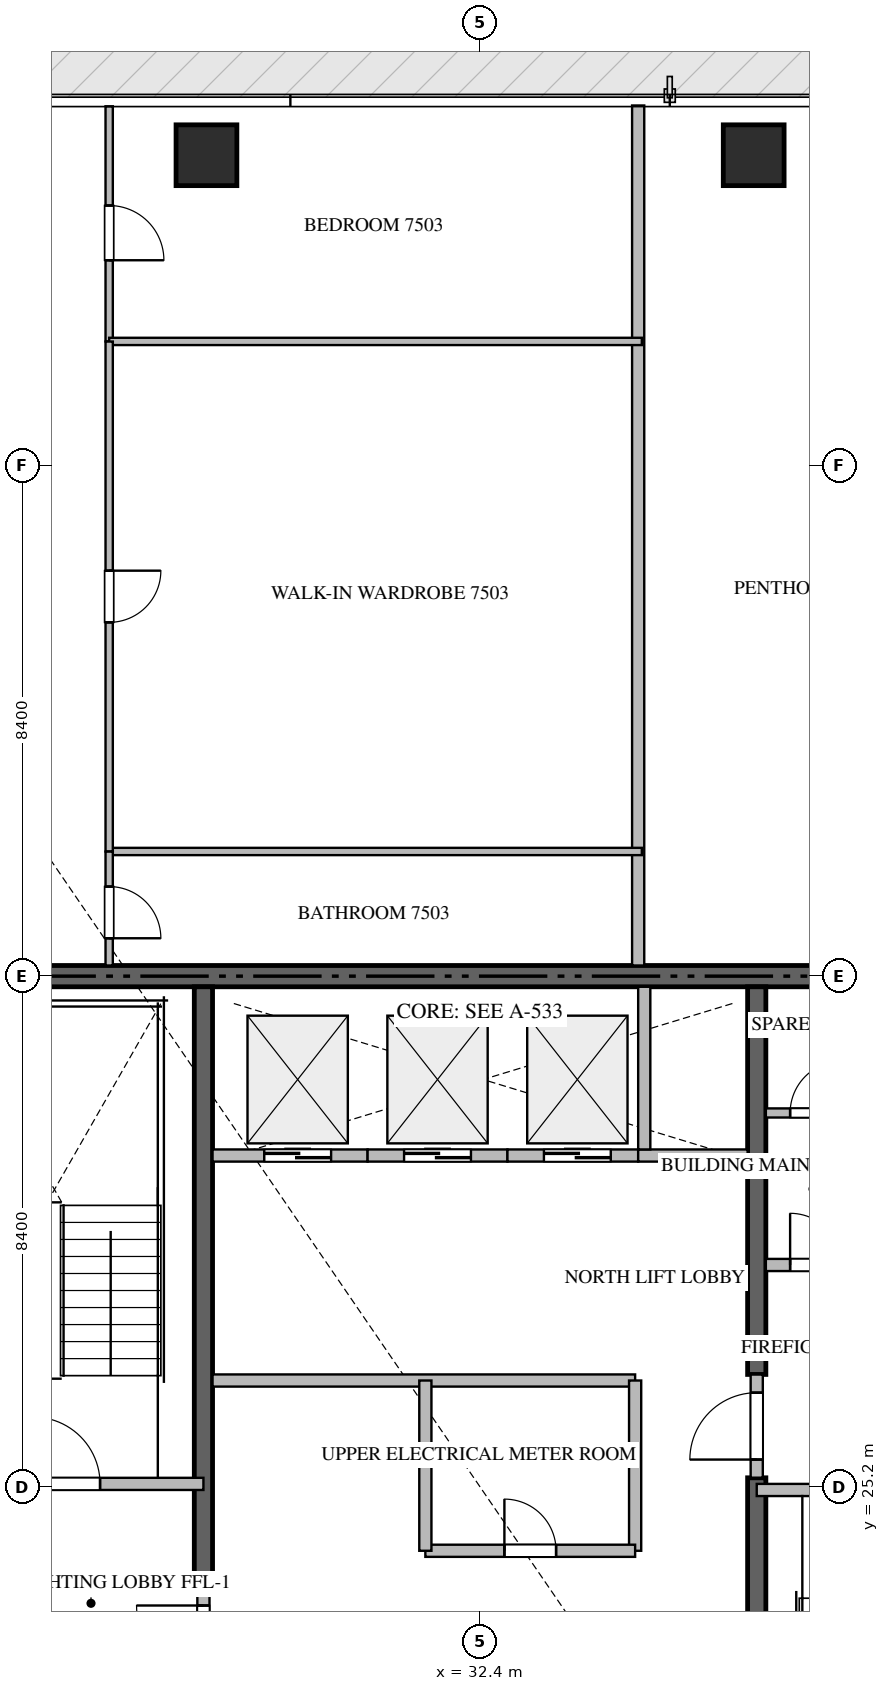
"""IFC4 building model, lengths in metres.
Left out: names, types, materials, properties, quantities, classifications, styles, units other than length and angle.
Written with IfcOpenShell. Run it as: python <this file> out.ifc"""

import sys

from ifc_helpers import new_model, si_unit, direction, frame, frame_2d, origin, origin_2d, place, context, subcontext, project, spatial, rectangle, extrude, source, transform, mapped, element, fill, save


model = new_model("IFC4")
c1 = context("Model", 3, precision=1e-05, world=origin(), true_north=direction((0.0, 1.0)))
c2 = subcontext(c1, "Body", "Model", "MODEL_VIEW")
j1 = project(units=[si_unit("LENGTHUNIT", "METRE"), si_unit("PLANEANGLEUNIT", "RADIAN")], contexts=[c1])
p1 = place(None, origin())
s1 = spatial("IfcSite", under=j1, at=p1, CompositionType="ELEMENT")
p2 = place(p1, origin())
s2 = spatial("IfcBuilding", under=s1, at=p2, CompositionType="ELEMENT")
p3 = place(p2, frame((0.0, 0.0, 301.55)))
s3 = spatial("IfcBuildingStorey", under=s2, at=p3, CompositionType="ELEMENT", Elevation=301.55)
p4 = place(p3, frame((41.4, 33.6, -0.26), z_axis=(0.0, 0.0, 1.0), x_axis=(-1.0, 0.0, 0.0)))
e1 = element("IfcWall", 1, at=p4, inside=s3, PredefinedType="SHEAR", context=c2, shape_type="SweptSolid", body=[
    extrude(rectangle(XDim=18.0, YDim=0.35, at=frame_2d((9.0, 0.0))), origin(), (0.0, 0.0, 1.0), 4.048),
])
p5 = place(p3, frame((27.85, 23.55, -0.26), z_axis=(0.0, 0.0, 1.0), x_axis=(0.0, 1.0, 0.0)))
e2 = element("IfcWall", 2, at=p5, inside=s3, PredefinedType="SHEAR", context=c2, shape_type="SweptSolid", body=[
    extrude(rectangle(XDim=9.875, YDim=0.3, at=frame_2d((4.938, 0.0))), origin(), (0.0, 0.0, 1.0), 4.048),
])
p6 = place(p3, frame((36.95, 16.975, -0.26), z_axis=(0.0, 0.0, 1.0), x_axis=(0.0, 1.0, 0.0)))
e3 = element("IfcWall", 3, at=p6, inside=s3, PredefinedType="SHEAR", context=c2, shape_type="SweptSolid", body=[
    extrude(rectangle(XDim=8.375, YDim=0.3, at=frame_2d((4.188, 0.0))), origin(), (0.0, 0.0, 1.0), 4.048),
])
p7 = place(p3, frame((36.95, 27.05, -0.26), z_axis=(0.0, 0.0, 1.0), x_axis=(0.0, 1.0, 0.0)))
e4 = element("IfcWall", 4, at=p7, inside=s3, PredefinedType="SHEAR", context=c2, shape_type="SweptSolid", body=[
    extrude(rectangle(XDim=6.375, YDim=0.3, at=frame_2d((3.188, 0.0))), origin(), (0.0, 0.0, 1.0), 4.048),
])
m1 = source(origin(), c2, "Body", "SweptSolid", [
    extrude(rectangle(XDim=1.0, YDim=1.0, at=origin_2d()), origin(), (0.0, 0.0, 1.0), 4.05),
])
for number, where, z_axis, x_axis in (
    (5, (27.9, 47.1, -0.26), (0.0, 0.0, 1.0), (1.0, 0.0, 0.0)),
    (6, (36.9, 47.1, -0.26), (0.0, 0.0, 1.0), (1.0, 0.0, 0.0)),
):
    element("IfcColumn", number, at=place(p3, frame(where, z_axis=z_axis, x_axis=x_axis)), inside=s3, PredefinedType="COLUMN", context=c2, shape_type="MappedRepresentation", body=[
        mapped(m1, transform((0.0, 0.0, 0.0), scale=1.0)),
    ])
p8 = place(p3, frame((23.4, 25.25, 0.0), z_axis=(0.0, 0.0, 1.0), x_axis=(1.0, 0.0, 0.0)))
e7 = element("IfcWall", 7, at=p8, inside=s3, PredefinedType="STANDARD", context=c2, shape_type="SweptSolid", body=[
    extrude(rectangle(XDim=4.45, YDim=0.2, at=frame_2d((2.225, 0.0))), origin(), (0.0, 0.0, 1.0), 3.79),
])
p9 = place(p8, frame((1.65, 0.0, 0.0)))
e8 = element("IfcOpeningElement", 8, at=p9, cuts=e7, PredefinedType="OPENING", context=c2, shape_type="SweptSolid", body=[
    extrude(rectangle(XDim=1.1, YDim=2.15, at=frame_2d((0.55, 1.075))), frame((0.0, 0.11, 0.0), z_axis=(0.0, -1.0, 0.0), x_axis=(1.0, 0.0, 0.0)), (0.0, 0.0, 1.0), 0.22),
])
p10 = place(p3, frame((36.95, 25.15, 0.0), z_axis=(0.0, 0.0, 1.0), x_axis=(1.0, 0.0, 0.0)))
e9 = element("IfcWall", 9, at=p10, inside=s3, PredefinedType="STANDARD", context=c2, shape_type="SweptSolid", body=[
    extrude(rectangle(XDim=4.45, YDim=0.2, at=frame_2d((2.225, 0.0))), origin(), (0.0, 0.0, 1.0), 3.79),
])
p11 = place(p10, frame((1.65, 0.0, 0.0)))
e10 = element("IfcOpeningElement", 10, at=p11, cuts=e9, PredefinedType="OPENING", context=c2, shape_type="SweptSolid", body=[
    extrude(rectangle(XDim=1.1, YDim=2.15, at=frame_2d((0.55, 1.075))), frame((0.0, 0.11, 0.0), z_axis=(0.0, -1.0, 0.0), x_axis=(1.0, 0.0, 0.0)), (0.0, 0.0, 1.0), 0.22),
])
p12 = place(p3, frame((28.0, 30.65, 0.0), z_axis=(0.0, 0.0, 1.0), x_axis=(1.0, 0.0, 0.0)))
e11 = element("IfcWall", 11, at=p12, inside=s3, PredefinedType="STANDARD", context=c2, shape_type="SweptSolid", body=[
    extrude(rectangle(XDim=2.55, YDim=0.2, at=frame_2d((1.275, 0.0))), origin(), (0.0, 0.0, 1.0), 3.79),
])
p13 = place(p12, frame((0.85, 0.0, 0.0)))
e12 = element("IfcOpeningElement", 12, at=p13, cuts=e11, PredefinedType="OPENING", context=c2, shape_type="SweptSolid", body=[
    extrude(rectangle(XDim=1.1, YDim=2.2, at=frame_2d((0.55, 1.1))), frame((0.0, 0.11, 0.0), z_axis=(0.0, -1.0, 0.0), x_axis=(1.0, 0.0, 0.0)), (0.0, 0.0, 1.0), 0.22),
])
p14 = place(p3, frame((30.55, 30.65, 0.0), z_axis=(0.0, 0.0, 1.0), x_axis=(1.0, 0.0, 0.0)))
e13 = element("IfcWall", 13, at=p14, inside=s3, PredefinedType="STANDARD", context=c2, shape_type="SweptSolid", body=[
    extrude(rectangle(XDim=2.3, YDim=0.2, at=frame_2d((1.15, 0.0))), origin(), (0.0, 0.0, 1.0), 3.79),
])
p15 = place(p14, frame((0.6, 0.0, 0.0)))
e14 = element("IfcOpeningElement", 14, at=p15, cuts=e13, PredefinedType="OPENING", context=c2, shape_type="SweptSolid", body=[
    extrude(rectangle(XDim=1.1, YDim=2.2, at=frame_2d((0.55, 1.1))), frame((0.0, 0.11, 0.0), z_axis=(0.0, -1.0, 0.0), x_axis=(1.0, 0.0, 0.0)), (0.0, 0.0, 1.0), 0.22),
])
p16 = place(p3, frame((32.85, 30.65, 0.0), z_axis=(0.0, 0.0, 1.0), x_axis=(1.0, 0.0, 0.0)))
e15 = element("IfcWall", 15, at=p16, inside=s3, PredefinedType="STANDARD", context=c2, shape_type="SweptSolid", body=[
    extrude(rectangle(XDim=2.15, YDim=0.2, at=frame_2d((1.075, 0.0))), origin(), (0.0, 0.0, 1.0), 3.79),
])
p17 = place(p16, frame((0.6, 0.0, 0.0)))
e16 = element("IfcOpeningElement", 16, at=p17, cuts=e15, PredefinedType="OPENING", context=c2, shape_type="SweptSolid", body=[
    extrude(rectangle(XDim=1.1, YDim=2.2, at=frame_2d((0.55, 1.1))), frame((0.0, 0.11, 0.0), z_axis=(0.0, -1.0, 0.0), x_axis=(1.0, 0.0, 0.0)), (0.0, 0.0, 1.0), 0.22),
])
p18 = place(p3, frame((35.0, 30.65, 0.0), z_axis=(0.0, 0.0, 1.0), x_axis=(1.0, 0.0, 0.0)))
e17 = element("IfcWall", 17, at=p18, inside=s3, PredefinedType="STANDARD", context=c2, shape_type="SweptSolid", body=[
    extrude(rectangle(XDim=1.8, YDim=0.2, at=frame_2d((0.9, 0.0))), origin(), (0.0, 0.0, 1.0), 3.79),
])
p19 = place(p3, frame((35.1, 30.75, 0.0), z_axis=(0.0, 0.0, 1.0), x_axis=(0.0, 1.0, 0.0)))
e18 = element("IfcWall", 18, at=p19, inside=s3, PredefinedType="STANDARD", context=c2, shape_type="SweptSolid", body=[
    extrude(rectangle(XDim=2.675, YDim=0.2, at=frame_2d((1.337, 0.0))), origin(), (0.0, 0.0, 1.0), 3.79),
])
p20 = place(p3, frame((37.1, 28.85, 0.0), z_axis=(0.0, 0.0, 1.0), x_axis=(1.0, 0.0, 0.0)))
e19 = element("IfcWall", 19, at=p20, inside=s3, PredefinedType="STANDARD", context=c2, shape_type="SweptSolid", body=[
    extrude(rectangle(XDim=1.648, YDim=0.2, at=frame_2d((0.824, 0.0))), origin(), (0.0, 0.0, 1.0), 3.79),
])
p21 = place(p20, frame((0.399, 0.0, 0.0)))
e20 = element("IfcOpeningElement", 20, at=p21, cuts=e19, PredefinedType="OPENING", context=c2, shape_type="SweptSolid", body=[
    extrude(rectangle(XDim=0.85, YDim=2.1, at=frame_2d((0.425, 1.05))), frame((0.0, 0.11, 0.0), z_axis=(0.0, -1.0, 0.0), x_axis=(1.0, 0.0, 0.0)), (0.0, 0.0, 1.0), 0.22),
])
p22 = place(p3, frame((27.85, 21.852, 0.0), z_axis=(0.0, 0.0, 1.0), x_axis=(0.0, 1.0, 0.0)))
e21 = element("IfcWall", 21, at=p22, inside=s3, PredefinedType="STANDARD", context=c2, shape_type="SweptSolid", body=[
    extrude(rectangle(XDim=1.696, YDim=0.2, at=frame_2d((0.848, 0.0))), origin(), (0.0, 0.0, 1.0), 3.79),
])
p23 = place(p22, frame((0.298, 0.0, 0.0)))
e22 = element("IfcOpeningElement", 22, at=p23, cuts=e21, PredefinedType="OPENING", context=c2, shape_type="SweptSolid", body=[
    extrude(rectangle(XDim=1.1, YDim=2.15, at=frame_2d((0.55, 1.075))), frame((0.0, 0.11, 0.0), z_axis=(0.0, -1.0, 0.0), x_axis=(1.0, 0.0, 0.0)), (0.0, 0.0, 1.0), 0.22),
])
p24 = place(p3, frame((36.95, 25.352, 0.0), z_axis=(0.0, 0.0, 1.0), x_axis=(0.0, 1.0, 0.0)))
e23 = element("IfcWall", 23, at=p24, inside=s3, PredefinedType="STANDARD", context=c2, shape_type="SweptSolid", body=[
    extrude(rectangle(XDim=1.696, YDim=0.2, at=frame_2d((0.848, 0.0))), origin(), (0.0, 0.0, 1.0), 3.79),
])
p25 = place(p24, frame((0.298, 0.0, 0.0)))
e24 = element("IfcOpeningElement", 24, at=p25, cuts=e23, PredefinedType="OPENING", context=c2, shape_type="SweptSolid", body=[
    extrude(rectangle(XDim=1.1, YDim=2.15, at=frame_2d((0.55, 1.075))), frame((0.0, 0.11, 0.0), z_axis=(0.0, -1.0, 0.0), x_axis=(1.0, 0.0, 0.0)), (0.0, 0.0, 1.0), 0.22),
])
p26 = place(p3, frame((37.1, 31.35, 0.0), z_axis=(0.0, 0.0, 1.0), x_axis=(1.0, 0.0, 0.0)))
e25 = element("IfcWall", 25, at=p26, inside=s3, PredefinedType="PARTITIONING", context=c2, shape_type="SweptSolid", body=[
    extrude(rectangle(XDim=1.648, YDim=0.15, at=frame_2d((0.824, 0.0))), origin(), (0.0, 0.0, 1.0), 3.79),
])
p27 = place(p26, frame((0.399, 0.0, 0.0)))
e26 = element("IfcOpeningElement", 26, at=p27, cuts=e25, PredefinedType="OPENING", context=c2, shape_type="SweptSolid", body=[
    extrude(rectangle(XDim=0.85, YDim=2.1, at=frame_2d((0.425, 1.05))), frame((0.0, 0.085, 0.0), z_axis=(0.0, -1.0, 0.0), x_axis=(1.0, 0.0, 0.0)), (0.0, 0.0, 1.0), 0.17),
])
p28 = place(p3, frame((28.0, 26.95, 0.0), z_axis=(0.0, 0.0, 1.0), x_axis=(1.0, 0.0, 0.0)))
e27 = element("IfcWall", 27, at=p28, inside=s3, PredefinedType="STANDARD", context=c2, shape_type="SweptSolid", body=[
    extrude(rectangle(XDim=6.95, YDim=0.2, at=frame_2d((3.475, 0.0))), origin(), (0.0, 0.0, 1.0), 3.79),
])
p29 = place(p3, frame((34.95, 24.15, 0.0), z_axis=(0.0, 0.0, 1.0), x_axis=(0.0, 1.0, 0.0)))
e28 = element("IfcWall", 28, at=p29, inside=s3, PredefinedType="STANDARD", context=c2, shape_type="SweptSolid", body=[
    extrude(rectangle(XDim=2.8, YDim=0.2, at=frame_2d((1.4, 0.0))), origin(), (0.0, 0.0, 1.0), 3.79),
])
p30 = place(p3, frame((31.5, 24.15, 0.0), z_axis=(0.0, 0.0, 1.0), x_axis=(1.0, 0.0, 0.0)))
e29 = element("IfcWall", 29, at=p30, inside=s3, PredefinedType="STANDARD", context=c2, shape_type="SweptSolid", body=[
    extrude(rectangle(XDim=3.45, YDim=0.2, at=frame_2d((1.725, 0.0))), origin(), (0.0, 0.0, 1.0), 3.79),
])
p31 = place(p30, frame((1.3, 0.0, 0.0)))
e30 = element("IfcOpeningElement", 30, at=p31, cuts=e29, PredefinedType="OPENING", context=c2, shape_type="SweptSolid", body=[
    extrude(rectangle(XDim=0.85, YDim=2.1, at=frame_2d((0.425, 1.05))), frame((0.0, 0.11, 0.0), z_axis=(0.0, -1.0, 0.0), x_axis=(1.0, 0.0, 0.0)), (0.0, 0.0, 1.0), 0.22),
])
p32 = place(p3, frame((31.5, 24.15, 0.0), z_axis=(0.0, 0.0, 1.0), x_axis=(0.0, 1.0, 0.0)))
e31 = element("IfcWall", 31, at=p32, inside=s3, PredefinedType="STANDARD", context=c2, shape_type="SweptSolid", body=[
    extrude(rectangle(XDim=2.8, YDim=0.2, at=frame_2d((1.4, 0.0))), origin(), (0.0, 0.0, 1.0), 3.79),
])
p33 = place(p3, frame((35.0, 33.775, 0.0), z_axis=(0.0, 0.0, 1.0), x_axis=(0.0, 1.0, 0.0)))
e32 = element("IfcWall", 32, at=p33, inside=s3, PredefinedType="PARTITIONING", context=c2, shape_type="SweptSolid", body=[
    extrude(rectangle(XDim=14.143, YDim=0.2, at=frame_2d((7.072, 0.0))), origin(), (0.0, 0.0, 1.0), 3.79),
])
p34 = place(p3, frame((26.3, 47.905, 0.0), z_axis=(0.0, 0.0, 1.0), x_axis=(0.0, -1.0, 0.0)))
e33 = element("IfcWall", 33, at=p34, inside=s3, PredefinedType="PARTITIONING", context=c2, shape_type="SweptSolid", body=[
    extrude(rectangle(XDim=3.867, YDim=0.12, at=frame_2d((1.934, 0.0))), origin(), (0.0, 0.0, 1.0), 3.79),
])
p35 = place(p34, frame((1.632, 0.0, 0.0)))
e34 = element("IfcOpeningElement", 34, at=p35, cuts=e33, PredefinedType="OPENING", context=c2, shape_type="SweptSolid", body=[
    extrude(rectangle(XDim=0.9, YDim=2.1, at=frame_2d((0.45, 1.05))), frame((0.0, 0.07, 0.0), z_axis=(0.0, -1.0, 0.0), x_axis=(1.0, 0.0, 0.0)), (0.0, 0.0, 1.0), 0.14),
])
for number, where, z_axis, x_axis in (
    (35, (26.3, 44.038, 0.0), (0.0, 0.0, 1.0), (1.0, 0.0, 0.0)),
    (36, (26.3, 35.65, 0.0), (0.0, 0.0, 1.0), (1.0, 0.0, 0.0)),
):
    element("IfcWall", number, at=place(p3, frame(where, z_axis=z_axis, x_axis=x_axis)), inside=s3, PredefinedType="PARTITIONING", context=c2, shape_type="SweptSolid", body=[
        extrude(rectangle(XDim=8.76, YDim=0.12, at=frame_2d((4.38, 0.0))), origin(), (0.0, 0.0, 1.0), 3.79),
    ])
p36 = place(p3, frame((26.3, 44.036, 0.0), z_axis=(0.0, 0.0, 1.0), x_axis=(0.0, -1.0, 0.0)))
e37 = element("IfcWall", 37, at=p36, inside=s3, PredefinedType="PARTITIONING", context=c2, shape_type="SweptSolid", body=[
    extrude(rectangle(XDim=8.386, YDim=0.12, at=frame_2d((4.193, 0.0))), origin(), (0.0, 0.0, 1.0), 3.79),
])
p37 = place(p36, frame((3.768, 0.0, 0.0)))
e38 = element("IfcOpeningElement", 38, at=p37, cuts=e37, PredefinedType="OPENING", context=c2, shape_type="SweptSolid", body=[
    extrude(rectangle(XDim=0.85, YDim=2.1, at=frame_2d((0.425, 1.05))), frame((0.0, 0.07, 0.0), z_axis=(0.0, -1.0, 0.0), x_axis=(1.0, 0.0, 0.0)), (0.0, 0.0, 1.0), 0.14),
])
p38 = place(p3, frame((26.3, 35.648, 0.0), z_axis=(0.0, 0.0, 1.0), x_axis=(0.0, -1.0, 0.0)))
e39 = element("IfcWall", 39, at=p38, inside=s3, PredefinedType="PARTITIONING", context=c2, shape_type="SweptSolid", body=[
    extrude(rectangle(XDim=1.873, YDim=0.12, at=frame_2d((0.937, 0.0))), origin(), (0.0, 0.0, 1.0), 3.79),
])
p39 = place(p38, frame((0.575, 0.0, 0.0)))
e40 = element("IfcOpeningElement", 40, at=p39, cuts=e39, PredefinedType="OPENING", context=c2, shape_type="SweptSolid", body=[
    extrude(rectangle(XDim=0.85, YDim=2.1, at=frame_2d((0.425, 1.05))), frame((0.0, 0.07, 0.0), z_axis=(0.0, -1.0, 0.0), x_axis=(1.0, 0.0, 0.0)), (0.0, 0.0, 1.0), 0.14),
])
m2 = source(origin(), c2, "Body", "SweptSolid", [
    extrude(rectangle(XDim=1.1, YDim=2.15, at=frame_2d((0.55, 1.075))), frame((0.0, 0.025, 0.0), z_axis=(0.0, -1.0, 0.0), x_axis=(1.0, 0.0, 0.0)), (0.0, 0.0, 1.0), 0.05),
])
p40 = place(p9, origin())
e41 = element("IfcDoor", 41, at=p40, inside=s3, OperationType="SINGLE_SWING_LEFT", PredefinedType="DOOR", context=c2, shape_type="MappedRepresentation", body=[
    mapped(m2, transform((0.0, 0.0, 0.0), scale=1.0)),
])
fill(e8, e41)
m3 = source(origin(), c2, "Body", "SweptSolid", [
    extrude(rectangle(XDim=1.1, YDim=2.2, at=frame_2d((0.55, 1.1))), frame((0.0, 0.025, 0.0), z_axis=(0.0, -1.0, 0.0), x_axis=(1.0, 0.0, 0.0)), (0.0, 0.0, 1.0), 0.05),
])
p41 = place(p13, origin())
e42 = element("IfcDoor", 42, at=p41, inside=s3, OperationType="DOUBLE_DOOR_SLIDING", PredefinedType="DOOR", context=c2, shape_type="MappedRepresentation", body=[
    mapped(m3, transform((0.0, 0.0, 0.0), scale=1.0)),
])
fill(e12, e42)
p42 = place(p15, origin())
e43 = element("IfcDoor", 43, at=p42, inside=s3, OperationType="DOUBLE_DOOR_SLIDING", PredefinedType="DOOR", context=c2, shape_type="MappedRepresentation", body=[
    mapped(m3, transform((0.0, 0.0, 0.0), scale=1.0)),
])
fill(e14, e43)
p43 = place(p17, origin())
e44 = element("IfcDoor", 44, at=p43, inside=s3, OperationType="DOUBLE_DOOR_SLIDING", PredefinedType="DOOR", context=c2, shape_type="MappedRepresentation", body=[
    mapped(m3, transform((0.0, 0.0, 0.0), scale=1.0)),
])
fill(e16, e44)
m4 = source(origin(), c2, "Body", "SweptSolid", [
    extrude(rectangle(XDim=0.85, YDim=2.1, at=frame_2d((0.425, 1.05))), frame((0.0, 0.025, 0.0), z_axis=(0.0, -1.0, 0.0), x_axis=(1.0, 0.0, 0.0)), (0.0, 0.0, 1.0), 0.05),
])
p44 = place(p21, origin())
e45 = element("IfcDoor", 45, at=p44, inside=s3, OperationType="SINGLE_SWING_LEFT", PredefinedType="DOOR", context=c2, shape_type="MappedRepresentation", body=[
    mapped(m4, transform((0.0, 0.0, 0.0), scale=1.0)),
])
fill(e20, e45)
p45 = place(p23, origin())
e46 = element("IfcDoor", 46, at=p45, inside=s3, OperationType="SINGLE_SWING_RIGHT", PredefinedType="DOOR", context=c2, shape_type="MappedRepresentation", body=[
    mapped(m2, transform((0.0, 0.0, 0.0), scale=1.0)),
])
fill(e22, e46)
p46 = place(p25, origin())
e47 = element("IfcDoor", 47, at=p46, inside=s3, OperationType="SINGLE_SWING_LEFT", PredefinedType="DOOR", context=c2, shape_type="MappedRepresentation", body=[
    mapped(m2, transform((0.0, 0.0, 0.0), scale=1.0)),
])
fill(e24, e47)
p47 = place(p27, origin())
e48 = element("IfcDoor", 48, at=p47, inside=s3, OperationType="SINGLE_SWING_RIGHT", PredefinedType="DOOR", context=c2, shape_type="MappedRepresentation", body=[
    mapped(m4, transform((0.0, 0.0, 0.0), scale=1.0)),
])
fill(e26, e48)
p48 = place(p31, origin())
e49 = element("IfcDoor", 49, at=p48, inside=s3, OperationType="SINGLE_SWING_LEFT", PredefinedType="DOOR", context=c2, shape_type="MappedRepresentation", body=[
    mapped(m4, transform((0.0, 0.0, 0.0), scale=1.0)),
])
fill(e30, e49)
m5 = source(origin(), c2, "Body", "SweptSolid", [
    extrude(rectangle(XDim=0.9, YDim=2.1, at=frame_2d((0.45, 1.05))), frame((0.0, 0.025, 0.0), z_axis=(0.0, -1.0, 0.0), x_axis=(1.0, 0.0, 0.0)), (0.0, 0.0, 1.0), 0.05),
])
p49 = place(p35, origin())
e50 = element("IfcDoor", 50, at=p49, inside=s3, OperationType="SINGLE_SWING_RIGHT", PredefinedType="DOOR", context=c2, shape_type="MappedRepresentation", body=[
    mapped(m5, transform((0.0, 0.0, 0.0), scale=1.0)),
])
fill(e34, e50)
p50 = place(p37, origin())
e51 = element("IfcDoor", 51, at=p50, inside=s3, OperationType="SINGLE_SWING_LEFT", PredefinedType="DOOR", context=c2, shape_type="MappedRepresentation", body=[
    mapped(m4, transform((0.0, 0.0, 0.0), scale=1.0)),
])
fill(e38, e51)
p51 = place(p39, origin())
e52 = element("IfcDoor", 52, at=p51, inside=s3, OperationType="SINGLE_SWING_RIGHT", PredefinedType="DOOR", context=c2, shape_type="MappedRepresentation", body=[
    mapped(m4, transform((0.0, 0.0, 0.0), scale=1.0)),
])
fill(e40, e52)
save(model, sys.argv[1])
